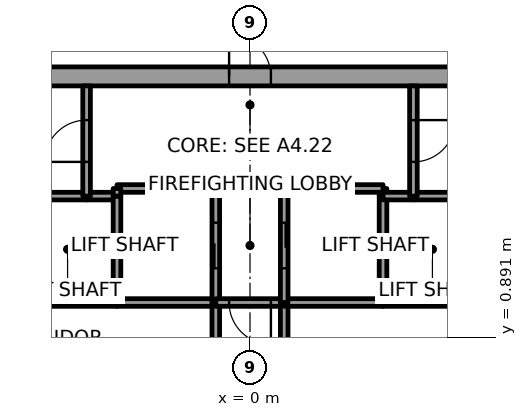
"""IFC4 building model, lengths in metres.
Left out: names, types, materials, properties, quantities, classifications, styles, units other than length and angle.
Written with IfcOpenShell. Run it as: python <this file> out.ifc"""

import sys

from ifc_helpers import new_model, si_unit, direction, frame, frame_2d, origin, place, context, subcontext, project, spatial, rectangle, extrude, element, fill, save


model = new_model("IFC4")
c1 = context("Model", 3, precision=1e-05, world=origin(), true_north=direction((0.0, 1.0)))
c2 = subcontext(c1, "Body", "Model", "MODEL_VIEW")
j1 = project(units=[si_unit("LENGTHUNIT", "METRE"), si_unit("PLANEANGLEUNIT", "RADIAN")], contexts=[c1])
p1 = place(None, origin())
s1 = spatial("IfcSite", under=j1, at=p1, CompositionType="ELEMENT")
p2 = place(p1, origin())
s2 = spatial("IfcBuilding", under=s1, at=p2, CompositionType="ELEMENT")
p3 = place(p2, frame((0.0, 0.0, 96.1)))
s3 = spatial("IfcBuildingStorey", under=s2, at=p3, CompositionType="ELEMENT", Elevation=96.1)
p4 = place(p3, frame((-11.0, 7.75, 0.0), z_axis=(0.0, 0.0, 1.0), x_axis=(1.0, 0.0, 0.0)))
e1 = element("IfcWall", 1, at=p4, inside=s3, PredefinedType="SHEAR", context=c2, shape_type="SweptSolid", body=[
    extrude(rectangle(XDim=22.0, YDim=0.5, at=frame_2d((11.0, 0.0))), origin(), (0.0, 0.0, 1.0), 3.7),
])
p5 = place(p4, frame((10.45, 0.0, 0.0)))
e2 = element("IfcOpeningElement", 2, at=p5, cuts=e1, PredefinedType="OPENING", context=c2, shape_type="SweptSolid", body=[
    extrude(rectangle(XDim=1.1, YDim=2.1, at=frame_2d((0.55, 1.05))), frame((0.0, 0.25, 0.0), z_axis=(0.0, -1.0, 0.0), x_axis=(1.0, 0.0, 0.0)), (0.0, 0.0, 1.0), 0.5),
])
p6 = place(p3, frame((-3.5, 1.8, 0.0), z_axis=(0.0, 0.0, 1.0), x_axis=(-1.0, 0.0, 0.0)))
e3 = element("IfcWall", 3, at=p6, inside=s3, PredefinedType="SOLIDWALL", context=c2, shape_type="SweptSolid", body=[
    extrude(rectangle(XDim=2.6, YDim=0.2, at=frame_2d((1.3, 0.0))), origin(), (0.0, 0.0, 1.0), 3.55),
])
p7 = place(p3, frame((-4.3, 4.6, 0.0), z_axis=(0.0, 0.0, 1.0), x_axis=(-1.0, 0.0, 0.0)))
e4 = element("IfcWall", 4, at=p7, inside=s3, PredefinedType="SOLIDWALL", context=c2, shape_type="SweptSolid", body=[
    extrude(rectangle(XDim=1.8, YDim=0.2, at=frame_2d((0.9, 0.0))), origin(), (0.0, 0.0, 1.0), 3.55),
])
p8 = place(p3, frame((-3.5, 4.6, 0.0), z_axis=(0.0, 0.0, 1.0), x_axis=(-1.0, 0.0, 0.0)))
e5 = element("IfcWall", 5, at=p8, inside=s3, PredefinedType="SOLIDWALL", context=c2, shape_type="SweptSolid", body=[
    extrude(rectangle(XDim=0.8, YDim=0.2, at=frame_2d((0.4, 0.0))), origin(), (0.0, 0.0, 1.0), 3.55),
])
p9 = place(p3, frame((-4.3, 4.6, 0.0), z_axis=(0.0, 0.0, 1.0), x_axis=(0.0, 1.0, 0.0)))
e6 = element("IfcWall", 6, at=p9, inside=s3, PredefinedType="SOLIDWALL", context=c2, shape_type="SweptSolid", body=[
    extrude(rectangle(XDim=2.9, YDim=0.2, at=frame_2d((1.45, 0.0))), origin(), (0.0, 0.0, 1.0), 3.55),
])
p10 = place(p9, frame((0.9, 0.0, 0.0)))
e7 = element("IfcOpeningElement", 7, at=p10, cuts=e6, PredefinedType="OPENING", context=c2, shape_type="SweptSolid", body=[
    extrude(rectangle(XDim=1.1, YDim=2.1, at=frame_2d((0.55, 1.05))), frame((0.0, 0.1, 0.0), z_axis=(0.0, -1.0, 0.0), x_axis=(1.0, 0.0, 0.0)), (0.0, 0.0, 1.0), 0.2),
])
p11 = place(p3, frame((-0.9, 1.8, 0.0), z_axis=(0.0, 0.0, 1.0), x_axis=(-1.0, 0.0, 0.0)))
e8 = element("IfcWall", 8, at=p11, inside=s3, PredefinedType="SOLIDWALL", context=c2, shape_type="SweptSolid", body=[
    extrude(rectangle(XDim=2.6, YDim=0.2, at=frame_2d((1.3, 0.0))), origin(), (0.0, 0.0, 1.0), 3.55),
])
p12 = place(p3, frame((-3.5, 4.6, 0.0), z_axis=(0.0, 0.0, 1.0), x_axis=(0.0, -1.0, 0.0)))
e9 = element("IfcWall", 9, at=p12, inside=s3, PredefinedType="SOLIDWALL", context=c2, shape_type="SweptSolid", body=[
    extrude(rectangle(XDim=2.8, YDim=0.2, at=frame_2d((1.4, 0.0))), origin(), (0.0, 0.0, 1.0), 3.55),
])
p13 = place(p3, frame((-0.9, 1.8, 0.0), z_axis=(0.0, 0.0, 1.0), x_axis=(0.0, 1.0, 0.0)))
e10 = element("IfcWall", 10, at=p13, inside=s3, PredefinedType="SOLIDWALL", context=c2, shape_type="SweptSolid", body=[
    extrude(rectangle(XDim=3.0, YDim=0.2, at=frame_2d((1.5, 0.0))), origin(), (0.0, 0.0, 1.0), 3.55),
])
p14 = place(p13, frame((0.9, 0.0, 0.0)))
e11 = element("IfcOpeningElement", 11, at=p14, cuts=e10, PredefinedType="OPENING", context=c2, shape_type="SweptSolid", body=[
    extrude(rectangle(XDim=1.2, YDim=2.1, at=frame_2d((0.6, 1.05))), frame((0.0, 0.1, 0.0), z_axis=(0.0, -1.0, 0.0), x_axis=(1.0, 0.0, 0.0)), (0.0, 0.0, 1.0), 0.2),
])
p15 = place(p3, frame((-0.9, 4.8, 0.0), z_axis=(0.0, 0.0, 1.0), x_axis=(-1.0, 0.0, 0.0)))
e12 = element("IfcWall", 12, at=p15, inside=s3, PredefinedType="SOLIDWALL", context=c2, shape_type="SweptSolid", body=[
    extrude(rectangle(XDim=2.6, YDim=0.2, at=frame_2d((1.3, 0.0))), origin(), (0.0, 0.0, 1.0), 3.55),
])
p16 = place(p3, frame((-3.5, 4.8, 0.0), z_axis=(0.0, 0.0, 1.0), x_axis=(0.0, -1.0, 0.0)))
e13 = element("IfcWall", 13, at=p16, inside=s3, PredefinedType="SOLIDWALL", context=c2, shape_type="SweptSolid", body=[
    extrude(rectangle(XDim=0.2, YDim=0.2, at=frame_2d((0.1, 0.0))), origin(), (0.0, 0.0, 1.0), 3.55),
])
p17 = place(p3, frame((-0.9, 1.8, 0.0), z_axis=(0.0, 0.0, 1.0), x_axis=(0.0, -1.0, 0.0)))
e14 = element("IfcWall", 14, at=p17, inside=s3, PredefinedType="SOLIDWALL", context=c2, shape_type="SweptSolid", body=[
    extrude(rectangle(XDim=3.6, YDim=0.2, at=frame_2d((1.8, 0.0))), origin(), (0.0, 0.0, 1.0), 3.55),
])
p18 = place(p17, frame((1.05, 0.0, 0.0)))
e15 = element("IfcOpeningElement", 15, at=p18, cuts=e14, PredefinedType="OPENING", context=c2, shape_type="SweptSolid", body=[
    extrude(rectangle(XDim=1.5, YDim=2.1, at=frame_2d((0.75, 1.05))), frame((0.0, 0.1, 0.0), z_axis=(0.0, -1.0, 0.0), x_axis=(1.0, 0.0, 0.0)), (0.0, 0.0, 1.0), 0.2),
])
p19 = place(p3, frame((0.9, 1.8, 0.0), z_axis=(0.0, 0.0, 1.0), x_axis=(-1.0, 0.0, 0.0)))
e16 = element("IfcWall", 16, at=p19, inside=s3, PredefinedType="SOLIDWALL", context=c2, shape_type="SweptSolid", body=[
    extrude(rectangle(XDim=1.8, YDim=0.2, at=frame_2d((0.9, 0.0))), origin(), (0.0, 0.0, 1.0), 3.55),
])
p20 = place(p19, frame((0.35, 0.0, 0.0)))
e17 = element("IfcOpeningElement", 17, at=p20, cuts=e16, PredefinedType="OPENING", context=c2, shape_type="SweptSolid", body=[
    extrude(rectangle(XDim=1.1, YDim=2.1, at=frame_2d((0.55, 1.05))), frame((0.0, 0.1, 0.0), z_axis=(0.0, -1.0, 0.0), x_axis=(1.0, 0.0, 0.0)), (0.0, 0.0, 1.0), 0.2),
])
p21 = place(p3, frame((0.9, -1.8, 0.0), z_axis=(0.0, 0.0, 1.0), x_axis=(0.0, 1.0, 0.0)))
e18 = element("IfcWall", 18, at=p21, inside=s3, PredefinedType="SOLIDWALL", context=c2, shape_type="SweptSolid", body=[
    extrude(rectangle(XDim=3.6, YDim=0.2, at=frame_2d((1.8, 0.0))), origin(), (0.0, 0.0, 1.0), 3.55),
])
p22 = place(p21, frame((1.05, 0.0, 0.0)))
e19 = element("IfcOpeningElement", 19, at=p22, cuts=e18, PredefinedType="OPENING", context=c2, shape_type="SweptSolid", body=[
    extrude(rectangle(XDim=1.5, YDim=2.1, at=frame_2d((0.75, 1.05))), frame((0.0, 0.1, 0.0), z_axis=(0.0, -1.0, 0.0), x_axis=(1.0, 0.0, 0.0)), (0.0, 0.0, 1.0), 0.2),
])
p23 = place(p3, frame((3.5, 1.8, 0.0), z_axis=(0.0, 0.0, 1.0), x_axis=(-1.0, 0.0, 0.0)))
e20 = element("IfcWall", 20, at=p23, inside=s3, PredefinedType="SOLIDWALL", context=c2, shape_type="SweptSolid", body=[
    extrude(rectangle(XDim=2.6, YDim=0.2, at=frame_2d((1.3, 0.0))), origin(), (0.0, 0.0, 1.0), 3.55),
])
p24 = place(p3, frame((3.5, 4.6, 0.0), z_axis=(0.0, 0.0, 1.0), x_axis=(0.0, 1.0, 0.0)))
e21 = element("IfcWall", 21, at=p24, inside=s3, PredefinedType="SOLIDWALL", context=c2, shape_type="SweptSolid", body=[
    extrude(rectangle(XDim=0.2, YDim=0.2, at=frame_2d((0.1, 0.0))), origin(), (0.0, 0.0, 1.0), 3.55),
])
p25 = place(p3, frame((3.5, 4.8, 0.0), z_axis=(0.0, 0.0, 1.0), x_axis=(-1.0, 0.0, 0.0)))
e22 = element("IfcWall", 22, at=p25, inside=s3, PredefinedType="SOLIDWALL", context=c2, shape_type="SweptSolid", body=[
    extrude(rectangle(XDim=2.6, YDim=0.2, at=frame_2d((1.3, 0.0))), origin(), (0.0, 0.0, 1.0), 3.55),
])
p26 = place(p3, frame((0.9, 4.8, 0.0), z_axis=(0.0, 0.0, 1.0), x_axis=(0.0, -1.0, 0.0)))
e23 = element("IfcWall", 23, at=p26, inside=s3, PredefinedType="SOLIDWALL", context=c2, shape_type="SweptSolid", body=[
    extrude(rectangle(XDim=3.0, YDim=0.2, at=frame_2d((1.5, 0.0))), origin(), (0.0, 0.0, 1.0), 3.55),
])
p27 = place(p26, frame((0.9, 0.0, 0.0)))
e24 = element("IfcOpeningElement", 24, at=p27, cuts=e23, PredefinedType="OPENING", context=c2, shape_type="SweptSolid", body=[
    extrude(rectangle(XDim=1.2, YDim=2.1, at=frame_2d((0.6, 1.05))), frame((0.0, 0.1, 0.0), z_axis=(0.0, -1.0, 0.0), x_axis=(1.0, 0.0, 0.0)), (0.0, 0.0, 1.0), 0.2),
])
p28 = place(p3, frame((6.1, 1.8, 0.0), z_axis=(0.0, 0.0, 1.0), x_axis=(-1.0, 0.0, 0.0)))
e25 = element("IfcWall", 25, at=p28, inside=s3, PredefinedType="SOLIDWALL", context=c2, shape_type="SweptSolid", body=[
    extrude(rectangle(XDim=2.6, YDim=0.2, at=frame_2d((1.3, 0.0))), origin(), (0.0, 0.0, 1.0), 3.55),
])
p29 = place(p3, frame((3.5, 1.8, 0.0), z_axis=(0.0, 0.0, 1.0), x_axis=(0.0, 1.0, 0.0)))
e26 = element("IfcWall", 26, at=p29, inside=s3, PredefinedType="SOLIDWALL", context=c2, shape_type="SweptSolid", body=[
    extrude(rectangle(XDim=2.8, YDim=0.2, at=frame_2d((1.4, 0.0))), origin(), (0.0, 0.0, 1.0), 3.55),
])
p30 = place(p3, frame((4.3, 4.6, 0.0), z_axis=(0.0, 0.0, 1.0), x_axis=(-1.0, 0.0, 0.0)))
e27 = element("IfcWall", 27, at=p30, inside=s3, PredefinedType="SOLIDWALL", context=c2, shape_type="SweptSolid", body=[
    extrude(rectangle(XDim=0.8, YDim=0.2, at=frame_2d((0.4, 0.0))), origin(), (0.0, 0.0, 1.0), 3.55),
])
p31 = place(p3, frame((6.1, 4.6, 0.0), z_axis=(0.0, 0.0, 1.0), x_axis=(-1.0, 0.0, 0.0)))
e28 = element("IfcWall", 28, at=p31, inside=s3, PredefinedType="SOLIDWALL", context=c2, shape_type="SweptSolid", body=[
    extrude(rectangle(XDim=1.8, YDim=0.2, at=frame_2d((0.9, 0.0))), origin(), (0.0, 0.0, 1.0), 3.55),
])
p32 = place(p3, frame((4.3, 7.5, 0.0), z_axis=(0.0, 0.0, 1.0), x_axis=(0.0, -1.0, 0.0)))
e29 = element("IfcWall", 29, at=p32, inside=s3, PredefinedType="SOLIDWALL", context=c2, shape_type="SweptSolid", body=[
    extrude(rectangle(XDim=2.9, YDim=0.2, at=frame_2d((1.45, 0.0))), origin(), (0.0, 0.0, 1.0), 3.55),
])
p33 = place(p32, frame((0.9, 0.0, 0.0)))
e30 = element("IfcOpeningElement", 30, at=p33, cuts=e29, PredefinedType="OPENING", context=c2, shape_type="SweptSolid", body=[
    extrude(rectangle(XDim=1.1, YDim=2.1, at=frame_2d((0.55, 1.05))), frame((0.0, 0.1, 0.0), z_axis=(0.0, -1.0, 0.0), x_axis=(1.0, 0.0, 0.0)), (0.0, 0.0, 1.0), 0.2),
])
p34 = place(p14, origin())
e31 = element("IfcDoor", 31, at=p34, inside=s3, OperationType="SLIDING_TO_RIGHT", PredefinedType="DOOR", context=c2, shape_type="SweptSolid", body=[
    extrude(rectangle(XDim=1.2, YDim=2.1, at=frame_2d((0.6, 1.05))), frame((0.0, 0.025, 0.0), z_axis=(0.0, -1.0, 0.0), x_axis=(1.0, 0.0, 0.0)), (0.0, 0.0, 1.0), 0.05),
])
fill(e11, e31)
p35 = place(p27, origin())
e32 = element("IfcDoor", 32, at=p35, inside=s3, OperationType="SLIDING_TO_RIGHT", PredefinedType="DOOR", context=c2, shape_type="SweptSolid", body=[
    extrude(rectangle(XDim=1.2, YDim=2.1, at=frame_2d((0.6, 1.05))), frame((0.0, 0.025, 0.0), z_axis=(0.0, -1.0, 0.0), x_axis=(1.0, 0.0, 0.0)), (0.0, 0.0, 1.0), 0.05),
])
fill(e24, e32)
p36 = place(p20, origin())
e33 = element("IfcDoor", 33, at=p36, inside=s3, OperationType="SINGLE_SWING_LEFT", PredefinedType="DOOR", context=c2, shape_type="SweptSolid", body=[
    extrude(rectangle(XDim=1.1, YDim=2.1, at=frame_2d((0.55, 1.05))), frame((0.0, 0.025, 0.0), z_axis=(0.0, -1.0, 0.0), x_axis=(1.0, 0.0, 0.0)), (0.0, 0.0, 1.0), 0.05),
])
fill(e17, e33)
p37 = place(p10, origin())
e34 = element("IfcDoor", 34, at=p37, inside=s3, OperationType="SINGLE_SWING_RIGHT", PredefinedType="DOOR", context=c2, shape_type="SweptSolid", body=[
    extrude(rectangle(XDim=1.1, YDim=2.1, at=frame_2d((0.55, 1.05))), frame((0.0, 0.025, 0.0), z_axis=(0.0, -1.0, 0.0), x_axis=(1.0, 0.0, 0.0)), (0.0, 0.0, 1.0), 0.05),
])
fill(e7, e34)
p38 = place(p33, origin())
e35 = element("IfcDoor", 35, at=p38, inside=s3, OperationType="SINGLE_SWING_RIGHT", PredefinedType="DOOR", context=c2, shape_type="SweptSolid", body=[
    extrude(rectangle(XDim=1.1, YDim=2.1, at=frame_2d((0.55, 1.05))), frame((0.0, 0.025, 0.0), z_axis=(0.0, -1.0, 0.0), x_axis=(1.0, 0.0, 0.0)), (0.0, 0.0, 1.0), 0.05),
])
fill(e30, e35)
p39 = place(p5, origin())
e36 = element("IfcDoor", 36, at=p39, inside=s3, OperationType="SINGLE_SWING_LEFT", PredefinedType="DOOR", context=c2, shape_type="SweptSolid", body=[
    extrude(rectangle(XDim=1.1, YDim=2.1, at=frame_2d((0.55, 1.05))), frame((0.0, 0.025, 0.0), z_axis=(0.0, -1.0, 0.0), x_axis=(1.0, 0.0, 0.0)), (0.0, 0.0, 1.0), 0.05),
])
fill(e2, e36)
save(model, sys.argv[1])
